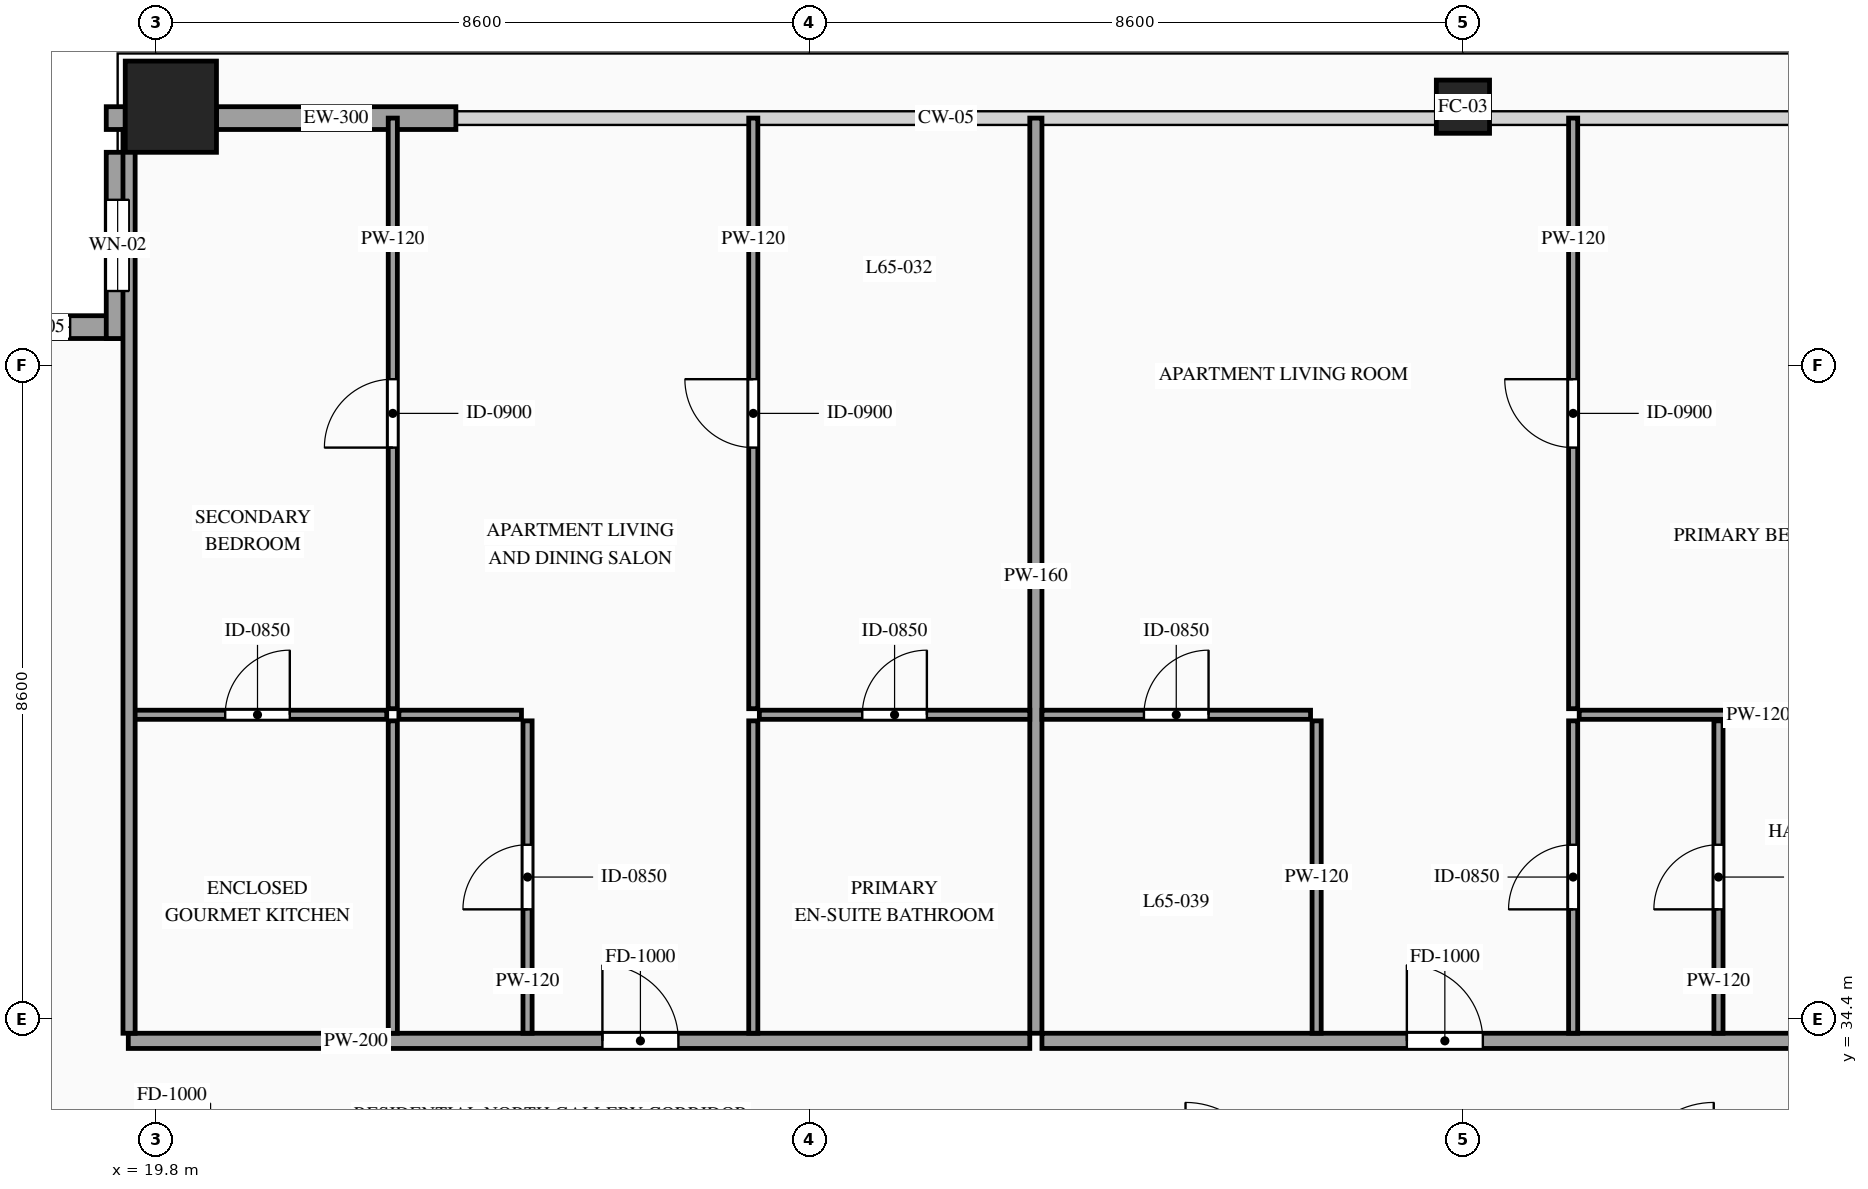
"""IFC4 building model, lengths in metres.
Left out: names, types, materials, properties, quantities, classifications, styles, units other than length and angle.
Written with IfcOpenShell. Run it as: python <this file> out.ifc"""

import sys

from ifc_helpers import new_model, si_unit, direction, frame, frame_2d, origin, origin_2d, place, context, subcontext, project, spatial, rectangle, hollow_rectangle, extrude, source, transform, mapped, element, fill, save


model = new_model("IFC4")
c1 = context("Model", 3, precision=1e-05, world=origin(), true_north=direction((0.0, 1.0)))
c2 = subcontext(c1, "Body", "Model", "MODEL_VIEW")
j1 = project(units=[si_unit("LENGTHUNIT", "METRE"), si_unit("PLANEANGLEUNIT", "RADIAN")], contexts=[c1])
p1 = place(None, origin())
s1 = spatial("IfcSite", under=j1, at=p1, CompositionType="ELEMENT")
p2 = place(p1, origin())
s2 = spatial("IfcBuilding", under=s1, at=p2, CompositionType="ELEMENT")
p3 = place(p2, frame((0.0, 0.0, 245.1)))
s3 = spatial("IfcBuildingStorey", under=s2, at=p3, CompositionType="ELEMENT", Elevation=245.1)
m1 = source(origin(), c2, "Body", "SweptSolid", [
    extrude(hollow_rectangle(XDim=1.2, YDim=1.2, WallThickness=0.055, at=origin_2d()), origin(), (0.0, 0.0, 1.0), 3.5),
])
p4 = place(p3, frame((20.0, 46.4, 0.0), z_axis=(0.0, 0.0, 1.0), x_axis=(1.0, 0.0, 0.0)))
e1 = element("IfcColumn", 1, at=p4, inside=s3, PredefinedType="COLUMN", context=c2, shape_type="MappedRepresentation", body=[
    mapped(m1, transform((0.0, 0.0, 0.0), scale=1.0)),
])
m2 = source(origin(), c2, "Body", "SweptSolid", [
    extrude(hollow_rectangle(XDim=0.7, YDim=0.7, WallThickness=0.032, at=origin_2d()), origin(), (0.0, 0.0, 1.0), 3.5),
])
p5 = place(p3, frame((37.0, 46.4, 0.0), z_axis=(0.0, 0.0, 1.0), x_axis=(1.0, 0.0, 0.0)))
e2 = element("IfcColumn", 2, at=p5, inside=s3, PredefinedType="COLUMN", context=c2, shape_type="MappedRepresentation", body=[
    mapped(m2, transform((0.0, 0.0, 0.0), scale=1.0)),
])
p6 = place(p3, frame((19.45, 43.5, 0.0), z_axis=(0.0, 0.0, 1.0), x_axis=(-1.0, 0.0, 0.0)))
e3 = element("IfcWall", 3, at=p6, inside=s3, PredefinedType="SOLIDWALL", context=c2, shape_type="SweptSolid", body=[
    extrude(rectangle(XDim=2.45, YDim=0.3, at=frame_2d((1.225, 0.0))), origin(), (0.0, 0.0, 1.0), 3.28),
])
p7 = place(p6, frame((0.775, 0.0, 0.85)))
e4 = element("IfcOpeningElement", 4, at=p7, cuts=e3, PredefinedType="OPENING", context=c2, shape_type="SweptSolid", body=[
    extrude(rectangle(XDim=0.9, YDim=1.5, at=frame_2d((0.45, 0.75))), frame((0.0, 0.165, 0.0), z_axis=(0.0, -1.0, 0.0), x_axis=(1.0, 0.0, 0.0)), (0.0, 0.0, 1.0), 0.33),
])
p8 = place(p3, frame((19.3, 45.8, 0.0), z_axis=(0.0, 0.0, 1.0), x_axis=(0.0, -1.0, 0.0)))
e5 = element("IfcWall", 5, at=p8, inside=s3, PredefinedType="SOLIDWALL", context=c2, shape_type="SweptSolid", body=[
    extrude(rectangle(XDim=2.45, YDim=0.3, at=frame_2d((1.225, 0.0))), origin(), (0.0, 0.0, 1.0), 3.28),
])
p9 = place(p8, frame((0.625, 0.0, 0.85)))
e6 = element("IfcOpeningElement", 6, at=p9, cuts=e5, PredefinedType="OPENING", context=c2, shape_type="SweptSolid", body=[
    extrude(rectangle(XDim=1.2, YDim=2.1, at=frame_2d((0.6, 1.05))), frame((0.0, 0.165, 0.0), z_axis=(0.0, -1.0, 0.0), x_axis=(1.0, 0.0, 0.0)), (0.0, 0.0, 1.0), 0.33),
])
m3 = source(origin(), c2, "Body", "SweptSolid", [
    extrude(rectangle(XDim=0.25, YDim=0.3, at=frame_2d((0.125, 0.0))), origin(), (0.0, 0.0, 1.0), 3.28),
])
p10 = place(p3, frame((19.15, 46.25, 0.0), z_axis=(0.0, 0.0, 1.0), x_axis=(1.0, 0.0, 0.0)))
e7 = element("IfcWall", 7, at=p10, inside=s3, PredefinedType="SOLIDWALL", context=c2, shape_type="MappedRepresentation", body=[
    mapped(m3, transform((0.0, 0.0, 0.0), scale=1.0)),
])
m4 = source(origin(), c2, "Body", "SweptSolid", [
    extrude(rectangle(XDim=3.15, YDim=0.3, at=frame_2d((1.575, 0.0))), origin(), (0.0, 0.0, 1.0), 2.835),
])
p11 = place(p3, frame((20.6, 46.25, 0.0), z_axis=(0.0, 0.0, 1.0), x_axis=(1.0, 0.0, 0.0)))
e8 = element("IfcWall", 8, at=p11, inside=s3, PredefinedType="SOLIDWALL", context=c2, shape_type="MappedRepresentation", body=[
    mapped(m4, transform((0.0, 0.0, 0.0), scale=1.0)),
])
p12 = place(p3, frame((19.44, 34.11, 0.0), z_axis=(0.0, 0.0, 1.0), x_axis=(1.0, 0.0, 0.0)))
e9 = element("IfcWall", 9, at=p12, inside=s3, PredefinedType="PARTITIONING", context=c2, shape_type="SweptSolid", body=[
    extrude(rectangle(XDim=11.861, YDim=0.2, at=frame_2d((5.931, 0.0))), origin(), (0.0, 0.0, 1.0), 3.28),
])
p13 = place(p12, frame((6.238, 0.0, 0.0)))
e10 = element("IfcOpeningElement", 10, at=p13, cuts=e9, PredefinedType="OPENING", context=c2, shape_type="SweptSolid", body=[
    extrude(rectangle(XDim=1.0, YDim=2.2, at=frame_2d((0.5, 1.1))), frame((0.0, 0.115, 0.0), z_axis=(0.0, -1.0, 0.0), x_axis=(1.0, 0.0, 0.0)), (0.0, 0.0, 1.0), 0.23),
])
m5 = source(origin(), c2, "Body", "SweptSolid", [
    extrude(rectangle(XDim=12.04, YDim=0.16, at=frame_2d((6.02, 0.0))), origin(), (0.0, 0.0, 1.0), 3.28),
])
p14 = place(p3, frame((31.381, 34.21, 0.0), z_axis=(0.0, 0.0, 1.0), x_axis=(0.0, 1.0, 0.0)))
e11 = element("IfcWall", 11, at=p14, inside=s3, PredefinedType="PARTITIONING", context=c2, shape_type="MappedRepresentation", body=[
    mapped(m5, transform((0.0, 0.0, 0.0), scale=1.0)),
])
p15 = place(p3, frame((19.44, 38.4, 0.0), z_axis=(0.0, 0.0, 1.0), x_axis=(1.0, 0.0, 0.0)))
e12 = element("IfcWall", 12, at=p15, inside=s3, PredefinedType="PARTITIONING", context=c2, shape_type="SweptSolid", body=[
    extrude(rectangle(XDim=3.4, YDim=0.12, at=frame_2d((1.7, 0.0))), origin(), (0.0, 0.0, 1.0), 3.28),
])
p16 = place(p15, frame((1.275, 0.0, 0.0)))
e13 = element("IfcOpeningElement", 13, at=p16, cuts=e12, PredefinedType="OPENING", context=c2, shape_type="SweptSolid", body=[
    extrude(rectangle(XDim=0.85, YDim=2.1, at=frame_2d((0.425, 1.05))), frame((0.0, 0.075, 0.0), z_axis=(0.0, -1.0, 0.0), x_axis=(1.0, 0.0, 0.0)), (0.0, 0.0, 1.0), 0.15),
])
m6 = source(origin(), c2, "Body", "SweptSolid", [
    extrude(rectangle(XDim=4.11, YDim=0.12, at=frame_2d((2.055, 0.0))), origin(), (0.0, 0.0, 1.0), 3.28),
])
p17 = place(p3, frame((22.92, 34.21, 0.0), z_axis=(0.0, 0.0, 1.0), x_axis=(0.0, 1.0, 0.0)))
e14 = element("IfcWall", 14, at=p17, inside=s3, PredefinedType="PARTITIONING", context=c2, shape_type="MappedRepresentation", body=[
    mapped(m6, transform((0.0, 0.0, 0.0), scale=1.0)),
])
m7 = source(origin(), c2, "Body", "SweptSolid", [
    extrude(rectangle(XDim=1.613, YDim=0.12, at=frame_2d((0.807, 0.0))), origin(), (0.0, 0.0, 1.0), 3.28),
])
p18 = place(p3, frame((23.0, 38.4, 0.0), z_axis=(0.0, 0.0, 1.0), x_axis=(1.0, 0.0, 0.0)))
e15 = element("IfcWall", 15, at=p18, inside=s3, PredefinedType="PARTITIONING", context=c2, shape_type="MappedRepresentation", body=[
    mapped(m7, transform((0.0, 0.0, 0.0), scale=1.0)),
])
p19 = place(p3, frame((24.693, 34.21, 0.0), z_axis=(0.0, 0.0, 1.0), x_axis=(0.0, 1.0, 0.0)))
e16 = element("IfcWall", 16, at=p19, inside=s3, PredefinedType="PARTITIONING", context=c2, shape_type="SweptSolid", body=[
    extrude(rectangle(XDim=4.11, YDim=0.12, at=frame_2d((2.055, 0.0))), origin(), (0.0, 0.0, 1.0), 3.28),
])
p20 = place(p19, frame((1.63, 0.0, 0.0)))
e17 = element("IfcOpeningElement", 17, at=p20, cuts=e16, PredefinedType="OPENING", context=c2, shape_type="SweptSolid", body=[
    extrude(rectangle(XDim=0.85, YDim=2.1, at=frame_2d((0.425, 1.05))), frame((0.0, 0.075, 0.0), z_axis=(0.0, -1.0, 0.0), x_axis=(1.0, 0.0, 0.0)), (0.0, 0.0, 1.0), 0.15),
])
p21 = place(p3, frame((27.743, 38.4, 0.0), z_axis=(0.0, 0.0, 1.0), x_axis=(1.0, 0.0, 0.0)))
e18 = element("IfcWall", 18, at=p21, inside=s3, PredefinedType="PARTITIONING", context=c2, shape_type="SweptSolid", body=[
    extrude(rectangle(XDim=3.558, YDim=0.12, at=frame_2d((1.779, 0.0))), origin(), (0.0, 0.0, 1.0), 3.28),
])
p22 = place(p21, frame((1.354, 0.0, 0.0)))
e19 = element("IfcOpeningElement", 19, at=p22, cuts=e18, PredefinedType="OPENING", context=c2, shape_type="SweptSolid", body=[
    extrude(rectangle(XDim=0.85, YDim=2.1, at=frame_2d((0.425, 1.05))), frame((0.0, 0.075, 0.0), z_axis=(0.0, -1.0, 0.0), x_axis=(1.0, 0.0, 0.0)), (0.0, 0.0, 1.0), 0.15),
])
p23 = place(p3, frame((27.663, 34.21, 0.0), z_axis=(0.0, 0.0, 1.0), x_axis=(0.0, 1.0, 0.0)))
e20 = element("IfcWall", 20, at=p23, inside=s3, PredefinedType="PARTITIONING", context=c2, shape_type="MappedRepresentation", body=[
    mapped(m6, transform((0.0, 0.0, 0.0), scale=1.0)),
])
p24 = place(p3, frame((22.92, 38.48, 0.0), z_axis=(0.0, 0.0, 1.0), x_axis=(0.0, 1.0, 0.0)))
e21 = element("IfcWall", 21, at=p24, inside=s3, PredefinedType="PARTITIONING", context=c2, shape_type="SweptSolid", body=[
    extrude(rectangle(XDim=7.77, YDim=0.12, at=frame_2d((3.885, 0.0))), origin(), (0.0, 0.0, 1.0), 3.28),
])
p25 = place(p24, frame((3.435, 0.0, 0.0)))
e22 = element("IfcOpeningElement", 22, at=p25, cuts=e21, PredefinedType="OPENING", context=c2, shape_type="SweptSolid", body=[
    extrude(rectangle(XDim=0.9, YDim=2.15, at=frame_2d((0.45, 1.075))), frame((0.0, 0.075, 0.0), z_axis=(0.0, -1.0, 0.0), x_axis=(1.0, 0.0, 0.0)), (0.0, 0.0, 1.0), 0.15),
])
p26 = place(p3, frame((27.663, 38.48, 0.0), z_axis=(0.0, 0.0, 1.0), x_axis=(0.0, 1.0, 0.0)))
e23 = element("IfcWall", 23, at=p26, inside=s3, PredefinedType="PARTITIONING", context=c2, shape_type="SweptSolid", body=[
    extrude(rectangle(XDim=7.77, YDim=0.12, at=frame_2d((3.885, 0.0))), origin(), (0.0, 0.0, 1.0), 3.28),
])
p27 = place(p26, frame((3.435, 0.0, 0.0)))
e24 = element("IfcOpeningElement", 24, at=p27, cuts=e23, PredefinedType="OPENING", context=c2, shape_type="SweptSolid", body=[
    extrude(rectangle(XDim=0.9, YDim=2.15, at=frame_2d((0.45, 1.075))), frame((0.0, 0.075, 0.0), z_axis=(0.0, -1.0, 0.0), x_axis=(1.0, 0.0, 0.0)), (0.0, 0.0, 1.0), 0.15),
])
p28 = place(p3, frame((31.461, 34.11, 0.0), z_axis=(0.0, 0.0, 1.0), x_axis=(1.0, 0.0, 0.0)))
e25 = element("IfcWall", 25, at=p28, inside=s3, PredefinedType="PARTITIONING", context=c2, shape_type="SweptSolid", body=[
    extrude(rectangle(XDim=11.781, YDim=0.2, at=frame_2d((5.891, 0.0))), origin(), (0.0, 0.0, 1.0), 3.28),
])
p29 = place(p28, frame((4.801, 0.0, 0.0)))
e26 = element("IfcOpeningElement", 26, at=p29, cuts=e25, PredefinedType="OPENING", context=c2, shape_type="SweptSolid", body=[
    extrude(rectangle(XDim=1.0, YDim=2.2, at=frame_2d((0.5, 1.1))), frame((0.0, 0.115, 0.0), z_axis=(0.0, -1.0, 0.0), x_axis=(1.0, 0.0, 0.0)), (0.0, 0.0, 1.0), 0.23),
])
p30 = place(p3, frame((31.461, 38.4, 0.0), z_axis=(0.0, 0.0, 1.0), x_axis=(1.0, 0.0, 0.0)))
e27 = element("IfcWall", 27, at=p30, inside=s3, PredefinedType="PARTITIONING", context=c2, shape_type="SweptSolid", body=[
    extrude(rectangle(XDim=3.534, YDim=0.12, at=frame_2d((1.767, 0.0))), origin(), (0.0, 0.0, 1.0), 3.28),
])
p31 = place(p30, frame((1.342, 0.0, 0.0)))
e28 = element("IfcOpeningElement", 28, at=p31, cuts=e27, PredefinedType="OPENING", context=c2, shape_type="SweptSolid", body=[
    extrude(rectangle(XDim=0.85, YDim=2.1, at=frame_2d((0.425, 1.05))), frame((0.0, 0.075, 0.0), z_axis=(0.0, -1.0, 0.0), x_axis=(1.0, 0.0, 0.0)), (0.0, 0.0, 1.0), 0.15),
])
p32 = place(p3, frame((35.075, 34.21, 0.0), z_axis=(0.0, 0.0, 1.0), x_axis=(0.0, 1.0, 0.0)))
e29 = element("IfcWall", 29, at=p32, inside=s3, PredefinedType="PARTITIONING", context=c2, shape_type="MappedRepresentation", body=[
    mapped(m6, transform((0.0, 0.0, 0.0), scale=1.0)),
])
p33 = place(p3, frame((40.362, 34.21, 0.0), z_axis=(0.0, 0.0, 1.0), x_axis=(0.0, 1.0, 0.0)))
e30 = element("IfcWall", 30, at=p33, inside=s3, PredefinedType="PARTITIONING", context=c2, shape_type="SweptSolid", body=[
    extrude(rectangle(XDim=4.11, YDim=0.12, at=frame_2d((2.055, 0.0))), origin(), (0.0, 0.0, 1.0), 3.28),
])
p34 = place(p33, frame((1.63, 0.0, 0.0)))
e31 = element("IfcOpeningElement", 31, at=p34, cuts=e30, PredefinedType="OPENING", context=c2, shape_type="SweptSolid", body=[
    extrude(rectangle(XDim=0.85, YDim=2.1, at=frame_2d((0.425, 1.05))), frame((0.0, 0.075, 0.0), z_axis=(0.0, -1.0, 0.0), x_axis=(1.0, 0.0, 0.0)), (0.0, 0.0, 1.0), 0.15),
])
m8 = source(origin(), c2, "Body", "SweptSolid", [
    extrude(rectangle(XDim=4.712, YDim=0.12, at=frame_2d((2.356, 0.0))), origin(), (0.0, 0.0, 1.0), 3.28),
])
p35 = place(p3, frame((38.53, 38.4, 0.0), z_axis=(0.0, 0.0, 1.0), x_axis=(1.0, 0.0, 0.0)))
e32 = element("IfcWall", 32, at=p35, inside=s3, PredefinedType="PARTITIONING", context=c2, shape_type="MappedRepresentation", body=[
    mapped(m8, transform((0.0, 0.0, 0.0), scale=1.0)),
])
p36 = place(p3, frame((38.45, 38.48, 0.0), z_axis=(0.0, 0.0, 1.0), x_axis=(0.0, 1.0, 0.0)))
e33 = element("IfcWall", 33, at=p36, inside=s3, PredefinedType="PARTITIONING", context=c2, shape_type="SweptSolid", body=[
    extrude(rectangle(XDim=7.77, YDim=0.12, at=frame_2d((3.885, 0.0))), origin(), (0.0, 0.0, 1.0), 3.28),
])
p37 = place(p36, frame((3.435, 0.0, 0.0)))
e34 = element("IfcOpeningElement", 34, at=p37, cuts=e33, PredefinedType="OPENING", context=c2, shape_type="SweptSolid", body=[
    extrude(rectangle(XDim=0.9, YDim=2.15, at=frame_2d((0.45, 1.075))), frame((0.0, 0.075, 0.0), z_axis=(0.0, -1.0, 0.0), x_axis=(1.0, 0.0, 0.0)), (0.0, 0.0, 1.0), 0.15),
])
p38 = place(p3, frame((38.45, 34.21, 0.0), z_axis=(0.0, 0.0, 1.0), x_axis=(0.0, 1.0, 0.0)))
e35 = element("IfcWall", 35, at=p38, inside=s3, PredefinedType="PARTITIONING", context=c2, shape_type="SweptSolid", body=[
    extrude(rectangle(XDim=4.11, YDim=0.12, at=frame_2d((2.055, 0.0))), origin(), (0.0, 0.0, 1.0), 3.28),
])
p39 = place(p38, frame((1.63, 0.0, 0.0)))
e36 = element("IfcOpeningElement", 36, at=p39, cuts=e35, PredefinedType="OPENING", context=c2, shape_type="SweptSolid", body=[
    extrude(rectangle(XDim=0.85, YDim=2.1, at=frame_2d((0.425, 1.05))), frame((0.0, 0.075, 0.0), z_axis=(0.0, -1.0, 0.0), x_axis=(1.0, 0.0, 0.0)), (0.0, 0.0, 1.0), 0.15),
])
m9 = source(origin(), c2, "Body", "SweptSolid", [
    extrude(rectangle(XDim=11.89, YDim=0.16, at=frame_2d((5.945, 0.0))), origin(), (0.0, 0.0, 1.0), 3.28),
])
p40 = place(p3, frame((19.45, 34.21, 0.0), z_axis=(0.0, 0.0, 1.0), x_axis=(0.0, 1.0, 0.0)))
e37 = element("IfcWall", 37, at=p40, inside=s3, PredefinedType="PARTITIONING", context=c2, shape_type="MappedRepresentation", body=[
    mapped(m9, transform((0.0, 0.0, 0.0), scale=1.0)),
])
m10 = source(origin(), c2, "Body", "SweptSolid", [
    extrude(rectangle(XDim=0.9, YDim=1.5, at=frame_2d((0.45, 0.75))), frame((0.0, 0.03, 0.0), z_axis=(0.0, -1.0, 0.0), x_axis=(1.0, 0.0, 0.0)), (0.0, 0.0, 1.0), 0.06),
])
p41 = place(p7, origin())
e38 = element("IfcWindow", 38, at=p41, inside=s3, PartitioningType="SINGLE_PANEL", PredefinedType="WINDOW", context=c2, shape_type="MappedRepresentation", body=[
    mapped(m10, transform((0.0, 0.0, 0.0), scale=1.0)),
])
fill(e4, e38)
m11 = source(origin(), c2, "Body", "SweptSolid", [
    extrude(rectangle(XDim=1.2, YDim=2.1, at=frame_2d((0.6, 1.05))), frame((0.0, 0.03, 0.0), z_axis=(0.0, -1.0, 0.0), x_axis=(1.0, 0.0, 0.0)), (0.0, 0.0, 1.0), 0.06),
])
p42 = place(p9, origin())
e39 = element("IfcWindow", 39, at=p42, inside=s3, PartitioningType="SINGLE_PANEL", PredefinedType="WINDOW", context=c2, shape_type="MappedRepresentation", body=[
    mapped(m11, transform((0.0, 0.0, 0.0), scale=1.0)),
])
fill(e6, e39)
m12 = source(origin(), c2, "Body", "SweptSolid", [
    extrude(rectangle(XDim=1.0, YDim=2.2, at=frame_2d((0.5, 1.1))), frame((0.0, 0.025, 0.0), z_axis=(0.0, -1.0, 0.0), x_axis=(1.0, 0.0, 0.0)), (0.0, 0.0, 1.0), 0.05),
])
p43 = place(p13, origin())
e40 = element("IfcDoor", 40, at=p43, inside=s3, OperationType="SINGLE_SWING_LEFT", PredefinedType="DOOR", context=c2, shape_type="MappedRepresentation", body=[
    mapped(m12, transform((0.0, 0.0, 0.0), scale=1.0)),
])
fill(e10, e40)
m13 = source(origin(), c2, "Body", "SweptSolid", [
    extrude(rectangle(XDim=0.85, YDim=2.1, at=frame_2d((0.425, 1.05))), frame((0.0, 0.025, 0.0), z_axis=(0.0, -1.0, 0.0), x_axis=(1.0, 0.0, 0.0)), (0.0, 0.0, 1.0), 0.05),
])
p44 = place(p16, origin())
e41 = element("IfcDoor", 41, at=p44, inside=s3, OperationType="SINGLE_SWING_RIGHT", PredefinedType="DOOR", context=c2, shape_type="MappedRepresentation", body=[
    mapped(m13, transform((0.0, 0.0, 0.0), scale=1.0)),
])
fill(e13, e41)
p45 = place(p20, origin())
e42 = element("IfcDoor", 42, at=p45, inside=s3, OperationType="SINGLE_SWING_LEFT", PredefinedType="DOOR", context=c2, shape_type="MappedRepresentation", body=[
    mapped(m13, transform((0.0, 0.0, 0.0), scale=1.0)),
])
fill(e17, e42)
p46 = place(p22, origin())
e43 = element("IfcDoor", 43, at=p46, inside=s3, OperationType="SINGLE_SWING_RIGHT", PredefinedType="DOOR", context=c2, shape_type="MappedRepresentation", body=[
    mapped(m13, transform((0.0, 0.0, 0.0), scale=1.0)),
])
fill(e19, e43)
m14 = source(origin(), c2, "Body", "SweptSolid", [
    extrude(rectangle(XDim=0.9, YDim=2.15, at=frame_2d((0.45, 1.075))), frame((0.0, 0.025, 0.0), z_axis=(0.0, -1.0, 0.0), x_axis=(1.0, 0.0, 0.0)), (0.0, 0.0, 1.0), 0.05),
])
p47 = place(p25, origin())
e44 = element("IfcDoor", 44, at=p47, inside=s3, OperationType="SINGLE_SWING_LEFT", PredefinedType="DOOR", context=c2, shape_type="MappedRepresentation", body=[
    mapped(m14, transform((0.0, 0.0, 0.0), scale=1.0)),
])
fill(e22, e44)
p48 = place(p27, origin())
e45 = element("IfcDoor", 45, at=p48, inside=s3, OperationType="SINGLE_SWING_RIGHT", PredefinedType="DOOR", context=c2, shape_type="MappedRepresentation", body=[
    mapped(m14, transform((0.0, 0.0, 0.0), scale=1.0)),
])
fill(e24, e45)
p49 = place(p29, origin())
e46 = element("IfcDoor", 46, at=p49, inside=s3, OperationType="SINGLE_SWING_LEFT", PredefinedType="DOOR", context=c2, shape_type="MappedRepresentation", body=[
    mapped(m12, transform((0.0, 0.0, 0.0), scale=1.0)),
])
fill(e26, e46)
p50 = place(p31, origin())
e47 = element("IfcDoor", 47, at=p50, inside=s3, OperationType="SINGLE_SWING_RIGHT", PredefinedType="DOOR", context=c2, shape_type="MappedRepresentation", body=[
    mapped(m13, transform((0.0, 0.0, 0.0), scale=1.0)),
])
fill(e28, e47)
p51 = place(p34, origin())
e48 = element("IfcDoor", 48, at=p51, inside=s3, OperationType="SINGLE_SWING_LEFT", PredefinedType="DOOR", context=c2, shape_type="MappedRepresentation", body=[
    mapped(m13, transform((0.0, 0.0, 0.0), scale=1.0)),
])
fill(e31, e48)
p52 = place(p37, origin())
e49 = element("IfcDoor", 49, at=p52, inside=s3, OperationType="SINGLE_SWING_RIGHT", PredefinedType="DOOR", context=c2, shape_type="MappedRepresentation", body=[
    mapped(m14, transform((0.0, 0.0, 0.0), scale=1.0)),
])
fill(e34, e49)
p53 = place(p39, origin())
e50 = element("IfcDoor", 50, at=p53, inside=s3, OperationType="SINGLE_SWING_LEFT", PredefinedType="DOOR", context=c2, shape_type="MappedRepresentation", body=[
    mapped(m13, transform((0.0, 0.0, 0.0), scale=1.0)),
])
fill(e36, e50)
save(model, sys.argv[1])
